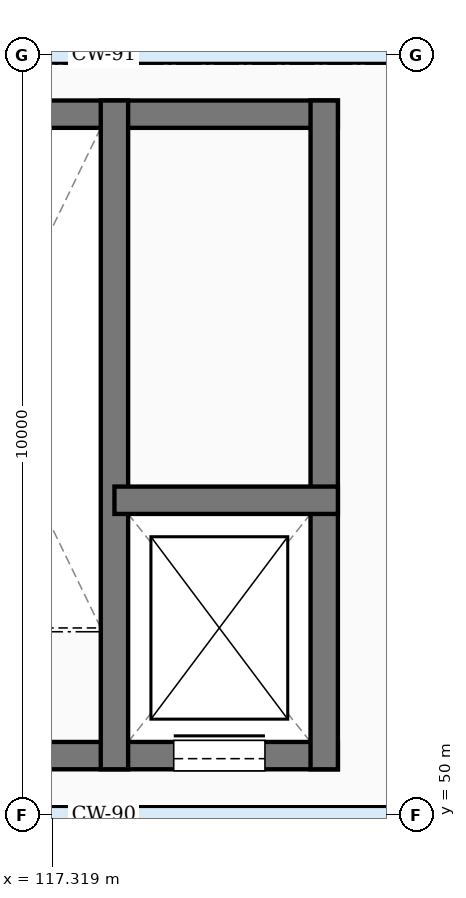
"""IFC4 building model, lengths in metres.
Left out: names, types, materials, properties, quantities, classifications, styles, units other than length and angle.
Written with IfcOpenShell. Run it as: python <this file> out.ifc"""

import sys

from ifc_helpers import new_model, si_unit, direction, frame, frame_2d, origin, place, context, subcontext, project, spatial, rectangle, extrude, element, fill, save


model = new_model("IFC4")
c1 = context("Model", 3, precision=1e-05, world=origin(), true_north=direction((0.0, 1.0)))
c2 = subcontext(c1, "Body", "Model", "MODEL_VIEW")
j1 = project(units=[si_unit("LENGTHUNIT", "METRE"), si_unit("PLANEANGLEUNIT", "RADIAN")], contexts=[c1])
p1 = place(None, origin())
s1 = spatial("IfcSite", under=j1, at=p1, CompositionType="ELEMENT")
p2 = place(p1, origin())
s2 = spatial("IfcBuilding", under=s1, at=p2, CompositionType="ELEMENT")
p3 = place(p2, frame((0.0, 0.0, 10.2)))
s3 = spatial("IfcBuildingStorey", under=s2, at=p3, CompositionType="ELEMENT", Elevation=10.2)
p4 = place(p3, frame((114.4, 50.78, 0.0), z_axis=(0.0, 0.0, 1.0), x_axis=(1.0, 0.0, 0.0)))
e1 = element("IfcWall", 1, at=p4, inside=s3, PredefinedType="SHEAR", context=c2, shape_type="SweptSolid", body=[
    extrude(rectangle(XDim=6.68, YDim=0.36, at=frame_2d((3.34, 0.0))), origin(), (0.0, 0.0, 1.0), 4.2),
])
p5 = place(p4, frame((0.51, 0.0, 0.0)))
e2 = element("IfcOpeningElement", 2, at=p5, cuts=e1, PredefinedType="OPENING", context=c2, shape_type="SweptSolid", body=[
    extrude(rectangle(XDim=1.45, YDim=2.4, at=frame_2d((0.725, 1.2))), frame((0.0, 0.19, 0.0), z_axis=(0.0, -1.0, 0.0), x_axis=(1.0, 0.0, 0.0)), (0.0, 0.0, 1.0), 0.38),
])
p6 = place(p4, frame((4.52, 0.0, 0.0)))
e3 = element("IfcOpeningElement", 3, at=p6, cuts=e1, PredefinedType="OPENING", context=c2, shape_type="SweptSolid", body=[
    extrude(rectangle(XDim=1.2, YDim=2.35, at=frame_2d((0.6, 1.175))), frame((0.0, 0.19, 0.0), z_axis=(0.0, -1.0, 0.0), x_axis=(1.0, 0.0, 0.0)), (0.0, 0.0, 1.0), 0.38),
])
p7 = place(p3, frame((114.4, 59.22, 0.0), z_axis=(0.0, 0.0, 1.0), x_axis=(1.0, 0.0, 0.0)))
e4 = element("IfcWall", 4, at=p7, inside=s3, PredefinedType="SHEAR", context=c2, shape_type="SweptSolid", body=[
    extrude(rectangle(XDim=6.68, YDim=0.36, at=frame_2d((3.34, 0.0))), origin(), (0.0, 0.0, 1.0), 4.2),
])
for number, where, z_axis, x_axis in (
    (5, (120.9, 50.6, 0.0), (0.0, 0.0, 1.0), (0.0, 1.0, 0.0)),
    (6, (118.14, 50.6, 0.0), (0.0, 0.0, 1.0), (0.0, 1.0, 0.0)),
):
    element("IfcWall", number, at=place(p3, frame(where, z_axis=z_axis, x_axis=x_axis)), inside=s3, PredefinedType="SHEAR", context=c2, shape_type="SweptSolid", body=[
        extrude(rectangle(XDim=8.8, YDim=0.36, at=frame_2d((4.4, 0.0))), origin(), (0.0, 0.0, 1.0), 4.2),
    ])
p8 = place(p3, frame((118.14, 54.14, 0.0), z_axis=(0.0, 0.0, 1.0), x_axis=(1.0, 0.0, 0.0)))
e7 = element("IfcWall", 7, at=p8, inside=s3, PredefinedType="SHEAR", context=c2, shape_type="SweptSolid", body=[
    extrude(rectangle(XDim=2.94, YDim=0.36, at=frame_2d((1.47, 0.0))), origin(), (0.0, 0.0, 1.0), 4.2),
])
p9 = place(p6, origin())
e8 = element("IfcDoor", 8, at=p9, inside=s3, OperationType="SLIDING_TO_LEFT", PredefinedType="DOOR", context=c2, shape_type="SweptSolid", body=[
    extrude(rectangle(XDim=1.2, YDim=2.35, at=frame_2d((0.6, 1.175))), frame((0.0, 0.025, 0.0), z_axis=(0.0, -1.0, 0.0), x_axis=(1.0, 0.0, 0.0)), (0.0, 0.0, 1.0), 0.05),
])
fill(e3, e8)
save(model, sys.argv[1])
